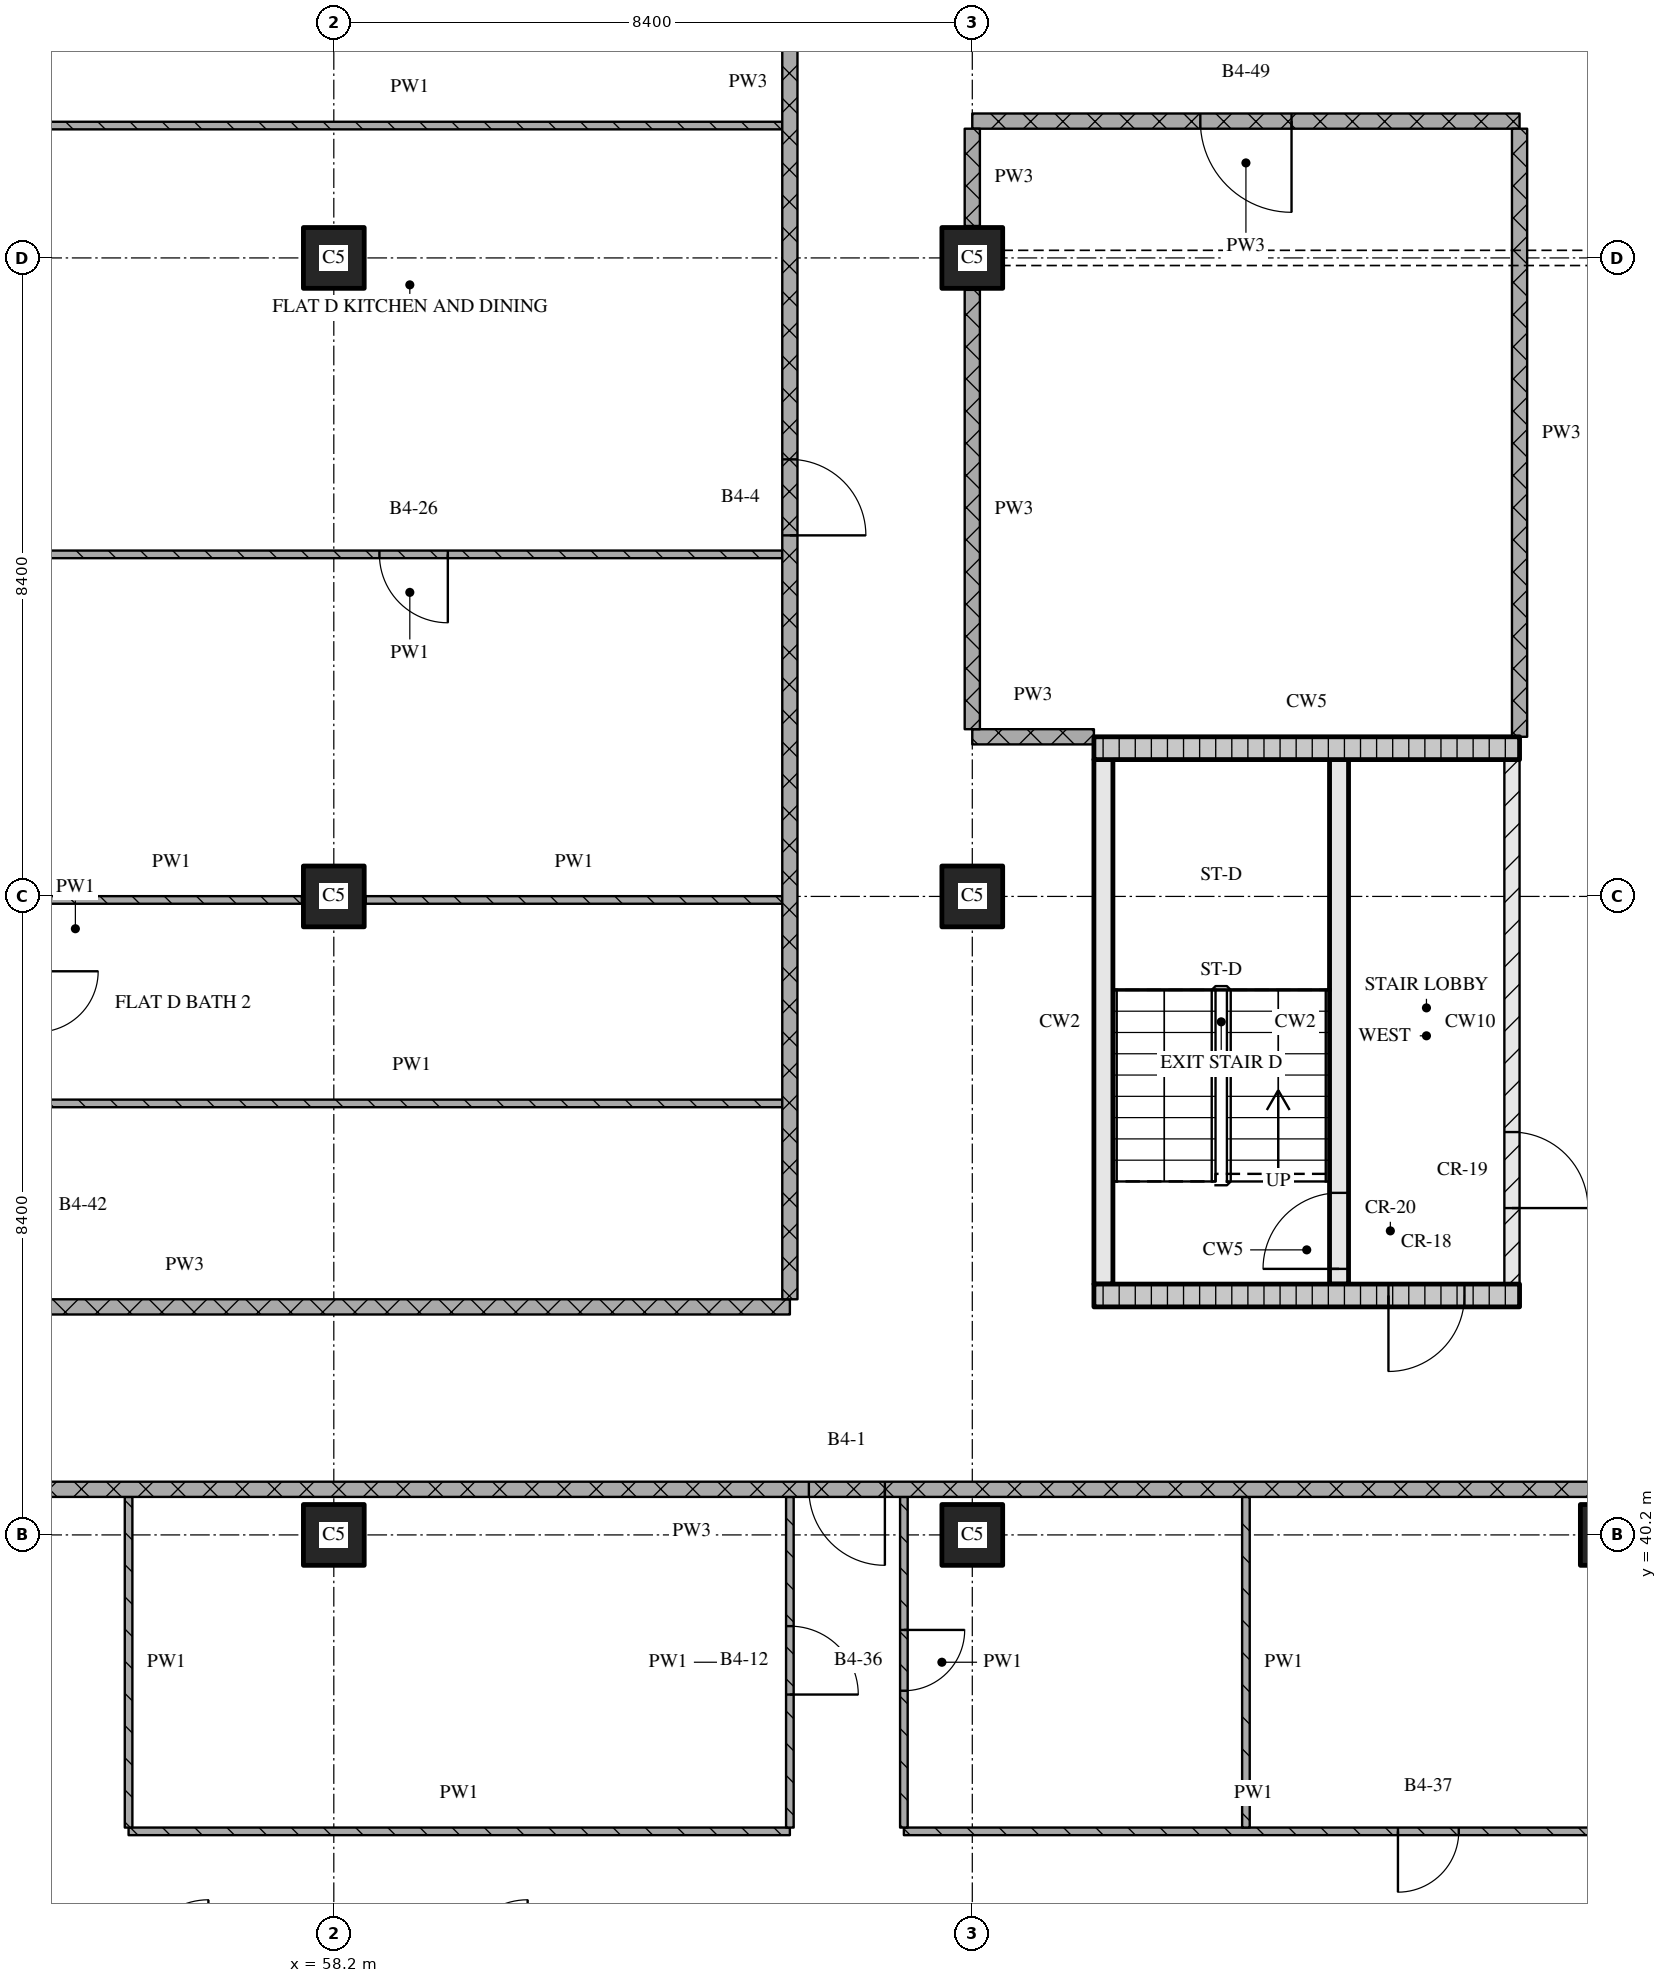
"""IFC4 building model, lengths in metres.
Left out: names, types, materials, properties, quantities, classifications, styles, units other than length and angle.
Written with IfcOpenShell. Run it as: python <this file> out.ifc"""

import sys

from ifc_helpers import new_model, si_unit, direction, frame, frame_2d, origin, origin_2d, place, context, subcontext, project, spatial, rectangle, extrude, element, fill, save


model = new_model("IFC4")
c1 = context("Model", 3, precision=1e-05, world=origin(), true_north=direction((0.0, 1.0)))
c2 = subcontext(c1, "Body", "Model", "MODEL_VIEW")
j1 = project(units=[si_unit("LENGTHUNIT", "METRE"), si_unit("PLANEANGLEUNIT", "RADIAN")], contexts=[c1])
p1 = place(None, origin())
s1 = spatial("IfcSite", under=j1, at=p1, CompositionType="ELEMENT")
p2 = place(p1, origin())
s2 = spatial("IfcBuilding", under=s1, at=p2, CompositionType="ELEMENT")
p3 = place(p2, frame((0.0, 0.0, 131.25)))
s3 = spatial("IfcBuildingStorey", under=s2, at=p3, CompositionType="ELEMENT", Elevation=131.25)
for number, where, z_axis, x_axis in (
    (1, (58.2, 40.2, 0.0), (0.0, 0.0, 1.0), (1.0, 0.0, 0.0)),
    (2, (58.2, 48.6, 0.0), (0.0, 0.0, 1.0), (1.0, 0.0, 0.0)),
    (3, (58.2, 57.0, 0.0), (0.0, 0.0, 1.0), (1.0, 0.0, 0.0)),
    (4, (66.6, 40.2, 0.0), (0.0, 0.0, 1.0), (1.0, 0.0, 0.0)),
    (5, (66.6, 48.6, 0.0), (0.0, 0.0, 1.0), (1.0, 0.0, 0.0)),
    (6, (66.6, 57.0, 0.0), (0.0, 0.0, 1.0), (1.0, 0.0, 0.0)),
    (7, (75.0, 40.2, 0.0), (0.0, 0.0, 1.0), (1.0, 0.0, 0.0)),
):
    element("IfcColumn", number, at=place(p3, frame(where, z_axis=z_axis, x_axis=x_axis)), inside=s3, PredefinedType="COLUMN", context=c2, shape_type="SweptSolid", body=[
        extrude(rectangle(XDim=0.8, YDim=0.8, at=origin_2d()), origin(), (0.0, 0.0, 1.0), 3.6),
    ])
p4 = place(p3, frame((68.2, 43.35, 0.0), z_axis=(0.0, 0.0, 1.0), x_axis=(1.0, 0.0, 0.0)))
e8 = element("IfcWall", 8, at=p4, inside=s3, PredefinedType="SOLIDWALL", context=c2, shape_type="SweptSolid", body=[
    extrude(rectangle(XDim=5.6, YDim=0.3, at=frame_2d((2.8, 0.0))), origin(), (0.0, 0.0, 1.0), 3.32),
])
p5 = place(p4, frame((3.875, 0.0, 0.0)))
e9 = element("IfcOpeningElement", 9, at=p5, cuts=e8, PredefinedType="OPENING", context=c2, shape_type="SweptSolid", body=[
    extrude(rectangle(XDim=1.0, YDim=2.1, at=frame_2d((0.5, 1.05))), frame((0.0, 0.16, 0.0), z_axis=(0.0, -1.0, 0.0), x_axis=(1.0, 0.0, 0.0)), (0.0, 0.0, 1.0), 0.32),
])
p6 = place(p3, frame((68.325, 43.5, 0.0), z_axis=(0.0, 0.0, 1.0), x_axis=(0.0, 1.0, 0.0)))
e10 = element("IfcWall", 10, at=p6, inside=s3, PredefinedType="SOLIDWALL", context=c2, shape_type="SweptSolid", body=[
    extrude(rectangle(XDim=6.9, YDim=0.25, at=frame_2d((3.45, 0.0))), origin(), (0.0, 0.0, 1.0), 3.32),
])
p7 = place(p3, frame((71.425, 43.5, 0.0), z_axis=(0.0, 0.0, 1.0), x_axis=(0.0, 1.0, 0.0)))
e11 = element("IfcWall", 11, at=p7, inside=s3, PredefinedType="SOLIDWALL", context=c2, shape_type="SweptSolid", body=[
    extrude(rectangle(XDim=6.9, YDim=0.25, at=frame_2d((3.45, 0.0))), origin(), (0.0, 0.0, 1.0), 3.32),
])
p8 = place(p7, frame((0.2, 0.0, 0.0)))
e12 = element("IfcOpeningElement", 12, at=p8, cuts=e11, PredefinedType="OPENING", context=c2, shape_type="SweptSolid", body=[
    extrude(rectangle(XDim=1.0, YDim=2.1, at=frame_2d((0.5, 1.05))), frame((0.0, 0.135, 0.0), z_axis=(0.0, -1.0, 0.0), x_axis=(1.0, 0.0, 0.0)), (0.0, 0.0, 1.0), 0.27),
])
p9 = place(p3, frame((73.7, 43.5, 0.0), z_axis=(0.0, 0.0, 1.0), x_axis=(0.0, 1.0, 0.0)))
e13 = element("IfcWall", 13, at=p9, inside=s3, PredefinedType="PARTITIONING", context=c2, shape_type="SweptSolid", body=[
    extrude(rectangle(XDim=6.9, YDim=0.2, at=frame_2d((3.45, 0.0))), origin(), (0.0, 0.0, 1.0), 3.32),
])
p10 = place(p9, frame((1.0, 0.0, 0.0)))
e14 = element("IfcOpeningElement", 14, at=p10, cuts=e13, PredefinedType="OPENING", context=c2, shape_type="SweptSolid", body=[
    extrude(rectangle(XDim=1.0, YDim=2.1, at=frame_2d((0.5, 1.05))), frame((0.0, 0.11, 0.0), z_axis=(0.0, -1.0, 0.0), x_axis=(1.0, 0.0, 0.0)), (0.0, 0.0, 1.0), 0.22),
])
p11 = place(p3, frame((68.2, 50.55, 0.0), z_axis=(0.0, 0.0, 1.0), x_axis=(1.0, 0.0, 0.0)))
e15 = element("IfcWall", 15, at=p11, inside=s3, PredefinedType="SOLIDWALL", context=c2, shape_type="SweptSolid", body=[
    extrude(rectangle(XDim=5.6, YDim=0.3, at=frame_2d((2.8, 0.0))), origin(), (0.0, 0.0, 1.0), 3.32),
])
p12 = place(p3, frame((55.5, 36.3, 0.0), z_axis=(0.0, 0.0, 1.0), x_axis=(1.0, 0.0, 0.0)))
e16 = element("IfcWall", 16, at=p12, inside=s3, PredefinedType="PARTITIONING", context=c2, shape_type="SweptSolid", body=[
    extrude(rectangle(XDim=8.7, YDim=0.1, at=frame_2d((4.35, 0.0))), origin(), (0.0, 0.0, 1.0), 3.32),
])
p13 = place(p3, frame((65.7, 36.3, 0.0), z_axis=(0.0, 0.0, 1.0), x_axis=(1.0, 0.0, 0.0)))
e17 = element("IfcWall", 17, at=p13, inside=s3, PredefinedType="PARTITIONING", context=c2, shape_type="SweptSolid", body=[
    extrude(rectangle(XDim=9.2, YDim=0.1, at=frame_2d((4.6, 0.0))), origin(), (0.0, 0.0, 1.0), 3.32),
])
p14 = place(p13, frame((6.5, 0.0, 0.0)))
e18 = element("IfcOpeningElement", 18, at=p14, cuts=e17, PredefinedType="OPENING", context=c2, shape_type="SweptSolid", body=[
    extrude(rectangle(XDim=0.8, YDim=2.1, at=frame_2d((0.4, 1.05))), frame((0.0, 0.06, 0.0), z_axis=(0.0, -1.0, 0.0), x_axis=(1.0, 0.0, 0.0)), (0.0, 0.0, 1.0), 0.12),
])
p15 = place(p3, frame((75.0, 40.8, 0.0), z_axis=(0.0, 0.0, 1.0), x_axis=(-1.0, 0.0, 0.0)))
e19 = element("IfcWall", 19, at=p15, inside=s3, PredefinedType="PARTITIONING", context=c2, shape_type="SweptSolid", body=[
    extrude(rectangle(XDim=24.18, YDim=0.2, at=frame_2d((12.09, 0.0))), origin(), (0.0, 0.0, 1.0), 3.32),
])
p16 = place(p15, frame((9.55, 0.0, 0.0)))
e20 = element("IfcOpeningElement", 20, at=p16, cuts=e19, PredefinedType="OPENING", context=c2, shape_type="SweptSolid", body=[
    extrude(rectangle(XDim=1.0, YDim=2.1, at=frame_2d((0.5, 1.05))), frame((0.0, 0.11, 0.0), z_axis=(0.0, -1.0, 0.0), x_axis=(1.0, 0.0, 0.0)), (0.0, 0.0, 1.0), 0.22),
])
p17 = place(p3, frame((48.28, 43.2, 0.0), z_axis=(0.0, 0.0, 1.0), x_axis=(1.0, 0.0, 0.0)))
e21 = element("IfcWall", 21, at=p17, inside=s3, PredefinedType="PARTITIONING", context=c2, shape_type="SweptSolid", body=[
    extrude(rectangle(XDim=15.92, YDim=0.2, at=frame_2d((7.96, 0.0))), origin(), (0.0, 0.0, 1.0), 3.32),
])
p18 = place(p3, frame((54.35, 45.877, 0.0), z_axis=(0.0, 0.0, 1.0), x_axis=(1.0, 0.0, 0.0)))
e22 = element("IfcWall", 22, at=p18, inside=s3, PredefinedType="PARTITIONING", context=c2, shape_type="SweptSolid", body=[
    extrude(rectangle(XDim=9.75, YDim=0.1, at=frame_2d((4.875, 0.0))), origin(), (0.0, 0.0, 1.0), 3.32),
])
p19 = place(p3, frame((54.35, 48.553, 0.0), z_axis=(0.0, 0.0, 1.0), x_axis=(1.0, 0.0, 0.0)))
e23 = element("IfcWall", 23, at=p19, inside=s3, PredefinedType="PARTITIONING", context=c2, shape_type="SweptSolid", body=[
    extrude(rectangle(XDim=3.43, YDim=0.1, at=frame_2d((1.715, 0.0))), origin(), (0.0, 0.0, 1.0), 3.32),
])
p20 = place(p3, frame((58.62, 48.553, 0.0), z_axis=(0.0, 0.0, 1.0), x_axis=(1.0, 0.0, 0.0)))
e24 = element("IfcWall", 24, at=p20, inside=s3, PredefinedType="PARTITIONING", context=c2, shape_type="SweptSolid", body=[
    extrude(rectangle(XDim=5.48, YDim=0.1, at=frame_2d((2.74, 0.0))), origin(), (0.0, 0.0, 1.0), 3.32),
])
p21 = place(p3, frame((66.6, 50.7, 0.0), z_axis=(0.0, 0.0, 1.0), x_axis=(1.0, 0.0, 0.0)))
e25 = element("IfcWall", 25, at=p21, inside=s3, PredefinedType="PARTITIONING", context=c2, shape_type="SweptSolid", body=[
    extrude(rectangle(XDim=1.6, YDim=0.2, at=frame_2d((0.8, 0.0))), origin(), (0.0, 0.0, 1.0), 3.32),
])
p22 = place(p3, frame((64.1, 53.1, 0.0), z_axis=(0.0, 0.0, 1.0), x_axis=(-1.0, 0.0, 0.0)))
e26 = element("IfcWall", 26, at=p22, inside=s3, PredefinedType="PARTITIONING", context=c2, shape_type="SweptSolid", body=[
    extrude(rectangle(XDim=9.8, YDim=0.1, at=frame_2d((4.9, 0.0))), origin(), (0.0, 0.0, 1.0), 3.32),
])
p23 = place(p22, frame((4.4, 0.0, 0.0)))
e27 = element("IfcOpeningElement", 27, at=p23, cuts=e26, PredefinedType="OPENING", context=c2, shape_type="SweptSolid", body=[
    extrude(rectangle(XDim=0.9, YDim=2.1, at=frame_2d((0.45, 1.05))), frame((0.0, 0.06, 0.0), z_axis=(0.0, -1.0, 0.0), x_axis=(1.0, 0.0, 0.0)), (0.0, 0.0, 1.0), 0.12),
])
p24 = place(p3, frame((54.3, 58.741, 0.0), z_axis=(0.0, 0.0, 1.0), x_axis=(1.0, 0.0, 0.0)))
e28 = element("IfcWall", 28, at=p24, inside=s3, PredefinedType="PARTITIONING", context=c2, shape_type="SweptSolid", body=[
    extrude(rectangle(XDim=9.8, YDim=0.1, at=frame_2d((4.9, 0.0))), origin(), (0.0, 0.0, 1.0), 3.32),
])
p25 = place(p3, frame((73.8, 58.8, 0.0), z_axis=(0.0, 0.0, 1.0), x_axis=(-1.0, 0.0, 0.0)))
e29 = element("IfcWall", 29, at=p25, inside=s3, PredefinedType="PARTITIONING", context=c2, shape_type="SweptSolid", body=[
    extrude(rectangle(XDim=7.2, YDim=0.2, at=frame_2d((3.6, 0.0))), origin(), (0.0, 0.0, 1.0), 3.32),
])
p26 = place(p25, frame((3.0, 0.0, 0.0)))
e30 = element("IfcOpeningElement", 30, at=p26, cuts=e29, PredefinedType="OPENING", context=c2, shape_type="SweptSolid", body=[
    extrude(rectangle(XDim=1.2, YDim=2.1, at=frame_2d((0.6, 1.05))), frame((0.0, 0.11, 0.0), z_axis=(0.0, -1.0, 0.0), x_axis=(1.0, 0.0, 0.0)), (0.0, 0.0, 1.0), 0.22),
])
p27 = place(p3, frame((55.5, 40.7, 0.0), z_axis=(0.0, 0.0, 1.0), x_axis=(0.0, -1.0, 0.0)))
e31 = element("IfcWall", 31, at=p27, inside=s3, PredefinedType="PARTITIONING", context=c2, shape_type="SweptSolid", body=[
    extrude(rectangle(XDim=4.35, YDim=0.1, at=frame_2d((2.175, 0.0))), origin(), (0.0, 0.0, 1.0), 3.32),
])
p28 = place(p3, frame((64.2, 43.3, 0.0), z_axis=(0.0, 0.0, 1.0), x_axis=(0.0, 1.0, 0.0)))
e32 = element("IfcWall", 32, at=p28, inside=s3, PredefinedType="PARTITIONING", context=c2, shape_type="SweptSolid", body=[
    extrude(rectangle(XDim=32.02, YDim=0.2, at=frame_2d((16.01, 0.0))), origin(), (0.0, 0.0, 1.0), 3.32),
])
p29 = place(p28, frame((10.05, 0.0, 0.0)))
e33 = element("IfcOpeningElement", 33, at=p29, cuts=e32, PredefinedType="OPENING", context=c2, shape_type="SweptSolid", body=[
    extrude(rectangle(XDim=1.0, YDim=2.1, at=frame_2d((0.5, 1.05))), frame((0.0, 0.11, 0.0), z_axis=(0.0, -1.0, 0.0), x_axis=(1.0, 0.0, 0.0)), (0.0, 0.0, 1.0), 0.22),
])
p30 = place(p28, frame((25.65, 0.0, 0.0)))
e34 = element("IfcOpeningElement", 34, at=p30, cuts=e32, PredefinedType="OPENING", context=c2, shape_type="SweptSolid", body=[
    extrude(rectangle(XDim=1.0, YDim=2.1, at=frame_2d((0.5, 1.05))), frame((0.0, 0.11, 0.0), z_axis=(0.0, -1.0, 0.0), x_axis=(1.0, 0.0, 0.0)), (0.0, 0.0, 1.0), 0.22),
])
p31 = place(p3, frame((64.2, 36.35, 0.0), z_axis=(0.0, 0.0, 1.0), x_axis=(0.0, 1.0, 0.0)))
e35 = element("IfcWall", 35, at=p31, inside=s3, PredefinedType="PARTITIONING", context=c2, shape_type="SweptSolid", body=[
    extrude(rectangle(XDim=4.35, YDim=0.1, at=frame_2d((2.175, 0.0))), origin(), (0.0, 0.0, 1.0), 3.32),
])
p32 = place(p31, frame((1.75, 0.0, 0.0)))
e36 = element("IfcOpeningElement", 36, at=p32, cuts=e35, PredefinedType="OPENING", context=c2, shape_type="SweptSolid", body=[
    extrude(rectangle(XDim=0.9, YDim=2.1, at=frame_2d((0.45, 1.05))), frame((0.0, 0.06, 0.0), z_axis=(0.0, -1.0, 0.0), x_axis=(1.0, 0.0, 0.0)), (0.0, 0.0, 1.0), 0.12),
])
p33 = place(p3, frame((65.7, 40.7, 0.0), z_axis=(0.0, 0.0, 1.0), x_axis=(0.0, -1.0, 0.0)))
e37 = element("IfcWall", 37, at=p33, inside=s3, PredefinedType="PARTITIONING", context=c2, shape_type="SweptSolid", body=[
    extrude(rectangle(XDim=4.35, YDim=0.1, at=frame_2d((2.175, 0.0))), origin(), (0.0, 0.0, 1.0), 3.32),
])
p34 = place(p33, frame((1.75, 0.0, 0.0)))
e38 = element("IfcOpeningElement", 38, at=p34, cuts=e37, PredefinedType="OPENING", context=c2, shape_type="SweptSolid", body=[
    extrude(rectangle(XDim=0.8, YDim=2.1, at=frame_2d((0.4, 1.05))), frame((0.0, 0.06, 0.0), z_axis=(0.0, -1.0, 0.0), x_axis=(1.0, 0.0, 0.0)), (0.0, 0.0, 1.0), 0.12),
])
p35 = place(p3, frame((66.6, 56.58, 0.0), z_axis=(0.0, 0.0, 1.0), x_axis=(0.0, -1.0, 0.0)))
e39 = element("IfcWall", 39, at=p35, inside=s3, PredefinedType="PARTITIONING", context=c2, shape_type="SweptSolid", body=[
    extrude(rectangle(XDim=5.78, YDim=0.2, at=frame_2d((2.89, 0.0))), origin(), (0.0, 0.0, 1.0), 3.32),
])
p36 = place(p3, frame((66.6, 58.7, 0.0), z_axis=(0.0, 0.0, 1.0), x_axis=(0.0, -1.0, 0.0)))
e40 = element("IfcWall", 40, at=p36, inside=s3, PredefinedType="PARTITIONING", context=c2, shape_type="SweptSolid", body=[
    extrude(rectangle(XDim=1.28, YDim=0.2, at=frame_2d((0.64, 0.0))), origin(), (0.0, 0.0, 1.0), 3.32),
])
p37 = place(p3, frame((70.2, 40.7, 0.0), z_axis=(0.0, 0.0, 1.0), x_axis=(0.0, -1.0, 0.0)))
e41 = element("IfcWall", 41, at=p37, inside=s3, PredefinedType="PARTITIONING", context=c2, shape_type="SweptSolid", body=[
    extrude(rectangle(XDim=4.35, YDim=0.1, at=frame_2d((2.175, 0.0))), origin(), (0.0, 0.0, 1.0), 3.32),
])
p38 = place(p3, frame((73.8, 58.7, 0.0), z_axis=(0.0, 0.0, 1.0), x_axis=(0.0, -1.0, 0.0)))
e42 = element("IfcWall", 42, at=p38, inside=s3, PredefinedType="PARTITIONING", context=c2, shape_type="SweptSolid", body=[
    extrude(rectangle(XDim=8.0, YDim=0.2, at=frame_2d((4.0, 0.0))), origin(), (0.0, 0.0, 1.0), 3.32),
])
p39 = place(p5, origin())
e43 = element("IfcDoor", 43, at=p39, inside=s3, OperationType="SINGLE_SWING_RIGHT", PredefinedType="DOOR", context=c2, shape_type="SweptSolid", body=[
    extrude(rectangle(XDim=1.0, YDim=2.1, at=frame_2d((0.5, 1.05))), frame((0.0, 0.025, 0.0), z_axis=(0.0, -1.0, 0.0), x_axis=(1.0, 0.0, 0.0)), (0.0, 0.0, 1.0), 0.05),
])
fill(e9, e43)
p40 = place(p8, origin())
e44 = element("IfcDoor", 44, at=p40, inside=s3, OperationType="SINGLE_SWING_LEFT", PredefinedType="DOOR", context=c2, shape_type="SweptSolid", body=[
    extrude(rectangle(XDim=1.0, YDim=2.1, at=frame_2d((0.5, 1.05))), frame((0.0, 0.025, 0.0), z_axis=(0.0, -1.0, 0.0), x_axis=(1.0, 0.0, 0.0)), (0.0, 0.0, 1.0), 0.05),
])
fill(e12, e44)
p41 = place(p10, origin())
e45 = element("IfcDoor", 45, at=p41, inside=s3, OperationType="SINGLE_SWING_RIGHT", PredefinedType="DOOR", context=c2, shape_type="SweptSolid", body=[
    extrude(rectangle(XDim=1.0, YDim=2.1, at=frame_2d((0.5, 1.05))), frame((0.0, 0.025, 0.0), z_axis=(0.0, -1.0, 0.0), x_axis=(1.0, 0.0, 0.0)), (0.0, 0.0, 1.0), 0.05),
])
fill(e14, e45)
p42 = place(p14, origin())
e46 = element("IfcDoor", 46, at=p42, inside=s3, OperationType="SINGLE_SWING_RIGHT", PredefinedType="DOOR", context=c2, shape_type="SweptSolid", body=[
    extrude(rectangle(XDim=0.8, YDim=2.1, at=frame_2d((0.4, 1.05))), frame((0.0, 0.025, 0.0), z_axis=(0.0, -1.0, 0.0), x_axis=(1.0, 0.0, 0.0)), (0.0, 0.0, 1.0), 0.05),
])
fill(e18, e46)
p43 = place(p16, origin())
e47 = element("IfcDoor", 47, at=p43, inside=s3, OperationType="SINGLE_SWING_LEFT", PredefinedType="DOOR", context=c2, shape_type="SweptSolid", body=[
    extrude(rectangle(XDim=1.0, YDim=2.1, at=frame_2d((0.5, 1.05))), frame((0.0, 0.025, 0.0), z_axis=(0.0, -1.0, 0.0), x_axis=(1.0, 0.0, 0.0)), (0.0, 0.0, 1.0), 0.05),
])
fill(e20, e47)
p44 = place(p23, origin())
e48 = element("IfcDoor", 48, at=p44, inside=s3, OperationType="SINGLE_SWING_LEFT", PredefinedType="DOOR", context=c2, shape_type="SweptSolid", body=[
    extrude(rectangle(XDim=0.9, YDim=2.1, at=frame_2d((0.45, 1.05))), frame((0.0, 0.025, 0.0), z_axis=(0.0, -1.0, 0.0), x_axis=(1.0, 0.0, 0.0)), (0.0, 0.0, 1.0), 0.05),
])
fill(e27, e48)
p45 = place(p26, origin())
e49 = element("IfcDoor", 49, at=p45, inside=s3, OperationType="SINGLE_SWING_LEFT", PredefinedType="DOOR", context=c2, shape_type="SweptSolid", body=[
    extrude(rectangle(XDim=1.2, YDim=2.1, at=frame_2d((0.6, 1.05))), frame((0.0, 0.025, 0.0), z_axis=(0.0, -1.0, 0.0), x_axis=(1.0, 0.0, 0.0)), (0.0, 0.0, 1.0), 0.05),
])
fill(e30, e49)
p46 = place(p29, origin())
e50 = element("IfcDoor", 50, at=p46, inside=s3, OperationType="SINGLE_SWING_RIGHT", PredefinedType="DOOR", context=c2, shape_type="SweptSolid", body=[
    extrude(rectangle(XDim=1.0, YDim=2.1, at=frame_2d((0.5, 1.05))), frame((0.0, 0.025, 0.0), z_axis=(0.0, -1.0, 0.0), x_axis=(1.0, 0.0, 0.0)), (0.0, 0.0, 1.0), 0.05),
])
fill(e33, e50)
p47 = place(p32, origin())
e51 = element("IfcDoor", 51, at=p47, inside=s3, OperationType="SINGLE_SWING_RIGHT", PredefinedType="DOOR", context=c2, shape_type="SweptSolid", body=[
    extrude(rectangle(XDim=0.9, YDim=2.1, at=frame_2d((0.45, 1.05))), frame((0.0, 0.025, 0.0), z_axis=(0.0, -1.0, 0.0), x_axis=(1.0, 0.0, 0.0)), (0.0, 0.0, 1.0), 0.05),
])
fill(e36, e51)
p48 = place(p34, origin())
e52 = element("IfcDoor", 52, at=p48, inside=s3, OperationType="SINGLE_SWING_LEFT", PredefinedType="DOOR", context=c2, shape_type="SweptSolid", body=[
    extrude(rectangle(XDim=0.8, YDim=2.1, at=frame_2d((0.4, 1.05))), frame((0.0, 0.025, 0.0), z_axis=(0.0, -1.0, 0.0), x_axis=(1.0, 0.0, 0.0)), (0.0, 0.0, 1.0), 0.05),
])
fill(e38, e52)
save(model, sys.argv[1])
